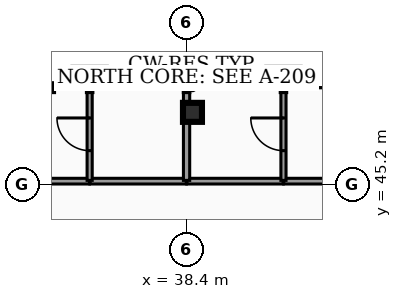
"""IFC4 building model, lengths in metres.
Left out: names, types, materials, properties, quantities, classifications, styles, units other than length and angle.
Written with IfcOpenShell. Run it as: python <this file> out.ifc"""

import sys

from ifc_helpers import new_model, si_unit, direction, frame, frame_2d, origin, origin_2d, place, context, subcontext, project, spatial, rectangle, hollow_rectangle, extrude, element, fill, save


model = new_model("IFC4")
c1 = context("Model", 3, precision=1e-05, world=origin(), true_north=direction((0.0, 1.0)))
c2 = subcontext(c1, "Body", "Model", "MODEL_VIEW")
j1 = project(units=[si_unit("LENGTHUNIT", "METRE"), si_unit("PLANEANGLEUNIT", "RADIAN")], contexts=[c1])
p1 = place(None, origin())
s1 = spatial("IfcSite", under=j1, at=p1, CompositionType="ELEMENT")
p2 = place(p1, origin())
s2 = spatial("IfcBuilding", under=s1, at=p2, CompositionType="ELEMENT")
p3 = place(p2, frame((0.0, 0.0, 275.4)))
s3 = spatial("IfcBuildingStorey", under=s2, at=p3, CompositionType="ELEMENT", Elevation=275.4)
p4 = place(p3, frame((38.555, 47.1, 0.0), z_axis=(-0.048734608296, -0.036627582965, 0.998139949166), x_axis=(0.6008041206, -0.799396277618, 0.0)))
e1 = element("IfcColumn", 1, at=p4, inside=s3, PredefinedType="COLUMN", context=c2, shape_type="SweptSolid", body=[
    extrude(hollow_rectangle(XDim=0.5, YDim=0.5, WallThickness=0.025, at=origin_2d()), origin(), (0.0, 0.0, 1.0), 3.186),
])
p5 = place(p3, frame((26.57, 45.29, 0.0), z_axis=(0.0, 0.0, 1.0), x_axis=(1.0, 0.0, 0.0)))
e2 = element("IfcWall", 2, at=p5, inside=s3, PredefinedType="PARTITIONING", context=c2, shape_type="SweptSolid", body=[
    extrude(rectangle(XDim=9.275, YDim=0.15, at=frame_2d((4.637, 0.0))), origin(), (0.0, 0.0, 1.0), 2.235),
])
p6 = place(p3, frame((35.855, 45.29, 0.0), z_axis=(0.0, 0.0, 1.0), x_axis=(1.0, 0.0, 0.0)))
e3 = element("IfcWall", 3, at=p6, inside=s3, PredefinedType="PARTITIONING", context=c2, shape_type="SweptSolid", body=[
    extrude(rectangle(XDim=2.54, YDim=0.15, at=frame_2d((1.27, 0.0))), origin(), (0.0, 0.0, 1.0), 2.235),
])
p7 = place(p3, frame((40.955, 45.29, 0.0), z_axis=(0.0, 0.0, 1.0), x_axis=(1.0, 0.0, 0.0)))
e4 = element("IfcWall", 4, at=p7, inside=s3, PredefinedType="PARTITIONING", context=c2, shape_type="SweptSolid", body=[
    extrude(rectangle(XDim=9.375, YDim=0.15, at=frame_2d((4.688, 0.0))), origin(), (0.0, 0.0, 1.0), 2.235),
])
p8 = place(p3, frame((38.405, 45.29, 0.0), z_axis=(0.0, 0.0, 1.0), x_axis=(1.0, 0.0, 0.0)))
e5 = element("IfcWall", 5, at=p8, inside=s3, PredefinedType="PARTITIONING", context=c2, shape_type="SweptSolid", body=[
    extrude(rectangle(XDim=2.54, YDim=0.15, at=frame_2d((1.27, 0.0))), origin(), (0.0, 0.0, 1.0), 2.235),
])
p9 = place(p3, frame((35.85, 45.31, 0.0), z_axis=(0.0, 0.0, 1.0), x_axis=(0.0, 1.0, 0.0)))
e6 = element("IfcWall", 6, at=p9, inside=s3, PredefinedType="PARTITIONING", context=c2, shape_type="SweptSolid", body=[
    extrude(rectangle(XDim=2.425, YDim=0.135, at=frame_2d((1.212, 0.0))), origin(), (0.0, 0.0, 1.0), 2.235),
])
p10 = place(p9, frame((0.782, 0.0, 0.0)))
e7 = element("IfcOpeningElement", 7, at=p10, cuts=e6, PredefinedType="OPENING", context=c2, shape_type="SweptSolid", body=[
    extrude(rectangle(XDim=0.86, YDim=2.05, at=frame_2d((0.43, 1.025))), frame((0.0, 0.077, 0.0), z_axis=(0.0, -1.0, 0.0), x_axis=(1.0, 0.0, 0.0)), (0.0, 0.0, 1.0), 0.155),
])
p11 = place(p3, frame((38.4, 45.31, 0.0), z_axis=(0.0, 0.0, 1.0), x_axis=(0.0, 1.0, 0.0)))
e8 = element("IfcWall", 8, at=p11, inside=s3, PredefinedType="PARTITIONING", context=c2, shape_type="SweptSolid", body=[
    extrude(rectangle(XDim=2.425, YDim=0.165, at=frame_2d((1.212, 0.0))), origin(), (0.0, 0.0, 1.0), 2.235),
])
p12 = place(p3, frame((40.95, 45.31, 0.0), z_axis=(0.0, 0.0, 1.0), x_axis=(0.0, 1.0, 0.0)))
e9 = element("IfcWall", 9, at=p12, inside=s3, PredefinedType="PARTITIONING", context=c2, shape_type="SweptSolid", body=[
    extrude(rectangle(XDim=2.425, YDim=0.135, at=frame_2d((1.212, 0.0))), origin(), (0.0, 0.0, 1.0), 2.235),
])
p13 = place(p12, frame((0.782, 0.0, 0.0)))
e10 = element("IfcOpeningElement", 10, at=p13, cuts=e9, PredefinedType="OPENING", context=c2, shape_type="SweptSolid", body=[
    extrude(rectangle(XDim=0.86, YDim=2.05, at=frame_2d((0.43, 1.025))), frame((0.0, 0.077, 0.0), z_axis=(0.0, -1.0, 0.0), x_axis=(1.0, 0.0, 0.0)), (0.0, 0.0, 1.0), 0.155),
])
p14 = place(p10, origin())
e11 = element("IfcDoor", 11, at=p14, inside=s3, OperationType="SINGLE_SWING_RIGHT", PredefinedType="DOOR", context=c2, shape_type="SweptSolid", body=[
    extrude(rectangle(XDim=0.86, YDim=2.05, at=frame_2d((0.43, 1.025))), frame((0.0, 0.025, 0.0), z_axis=(0.0, -1.0, 0.0), x_axis=(1.0, 0.0, 0.0)), (0.0, 0.0, 1.0), 0.05),
])
fill(e7, e11)
p15 = place(p13, origin())
e12 = element("IfcDoor", 12, at=p15, inside=s3, OperationType="SINGLE_SWING_RIGHT", PredefinedType="DOOR", context=c2, shape_type="SweptSolid", body=[
    extrude(rectangle(XDim=0.86, YDim=2.05, at=frame_2d((0.43, 1.025))), frame((0.0, 0.025, 0.0), z_axis=(0.0, -1.0, 0.0), x_axis=(1.0, 0.0, 0.0)), (0.0, 0.0, 1.0), 0.05),
])
fill(e10, e12)
save(model, sys.argv[1])
